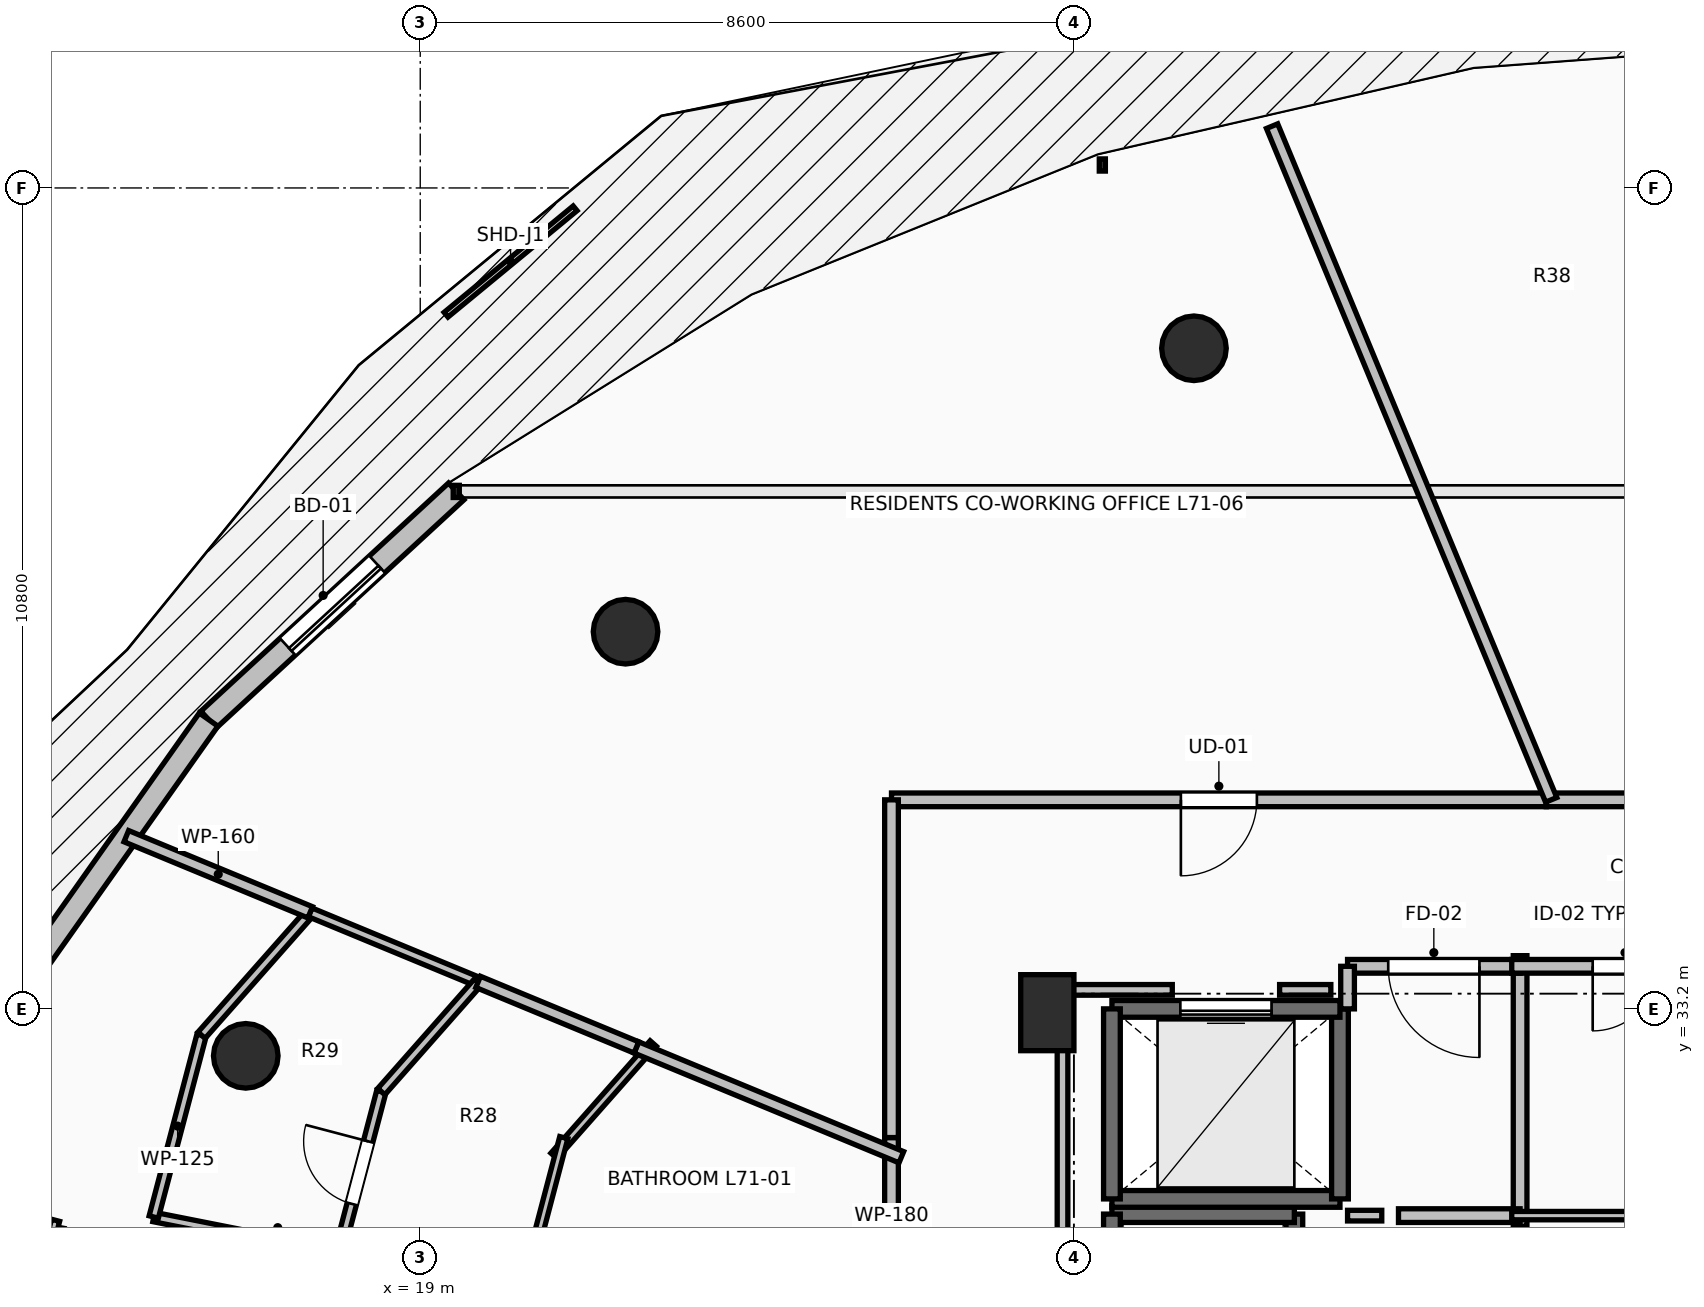
"""IFC4 building model, lengths in metres.
Left out: names, types, materials, properties, quantities, classifications, styles, units other than length and angle.
Written with IfcOpenShell. Run it as: python <this file> out.ifc"""

import sys

from ifc_helpers import new_model, si_unit, direction, frame, frame_2d, origin, origin_2d, place, context, subcontext, project, spatial, rectangle, circle, extrude, element, fill, save


model = new_model("IFC4")
c1 = context("Model", 3, precision=1e-05, world=origin(), true_north=direction((0.0, 1.0)))
c2 = subcontext(c1, "Body", "Model", "MODEL_VIEW")
j1 = project(units=[si_unit("LENGTHUNIT", "METRE"), si_unit("PLANEANGLEUNIT", "RADIAN")], contexts=[c1])
p1 = place(None, origin())
s1 = spatial("IfcSite", under=j1, at=p1, CompositionType="ELEMENT")
p2 = place(p1, origin())
s2 = spatial("IfcBuilding", under=s1, at=p2, CompositionType="ELEMENT")
p3 = place(p2, frame((0.0, 0.0, 262.65)))
s3 = spatial("IfcBuildingStorey", under=s2, at=p3, CompositionType="ELEMENT", Elevation=262.65)
for number, where, z_axis, x_axis in (
    (1, (29.179, 41.891, 0.0), (0.0, 0.0, 1.0), (-0.383, 0.924, 0.0)),
    (2, (21.701, 38.162, 0.0), (0.0, 0.0, 1.0), (-0.707, 0.707, 0.0)),
    (3, (16.705, 32.582, 0.0), (0.0, 0.0, 1.0), (-0.924, 0.383, 0.0)),
):
    element("IfcColumn", number, at=place(p3, frame(where, z_axis=z_axis, x_axis=x_axis)), inside=s3, PredefinedType="COLUMN", context=c2, shape_type="SweptSolid", body=[
        extrude(circle(Radius=0.425, at=origin_2d()), origin(), (0.0, 0.0, 1.0), 3.55),
    ])
p4 = place(p3, frame((27.25, 33.15, 0.0), z_axis=(0.0, 0.0, 1.0), x_axis=(1.0, 0.0, 0.0)))
e4 = element("IfcColumn", 4, at=p4, inside=s3, PredefinedType="PILASTER", context=c2, shape_type="SweptSolid", body=[
    extrude(rectangle(XDim=0.7, YDim=1.0, at=origin_2d()), origin(), (0.0, 0.0, 1.0), 3.55),
])
p5 = place(p3, frame((19.474, 40.008, 0.0), z_axis=(0.0, 0.0, 1.0), x_axis=(-0.735445373611, -0.677584018727, 0.0)))
e5 = element("IfcWall", 5, at=p5, inside=s3, PredefinedType="STANDARD", context=c2, shape_type="SweptSolid", body=[
    extrude(rectangle(XDim=4.43, YDim=0.3, at=frame_2d((2.215, 0.0))), origin(), (0.0, 0.0, 1.0), 3.29),
])
p6 = place(p5, frame((1.415, 0.0, 0.0)))
e6 = element("IfcOpeningElement", 6, at=p6, cuts=e5, PredefinedType="OPENING", context=c2, shape_type="SweptSolid", body=[
    extrude(rectangle(XDim=1.6, YDim=2.3, at=frame_2d((0.8, 1.15))), frame((0.0, 0.165, 0.0), z_axis=(0.0, -1.0, 0.0), x_axis=(1.0, 0.0, 0.0)), (0.0, 0.0, 1.0), 0.33),
])
p7 = place(p3, frame((16.216, 37.006, 0.0), z_axis=(0.0, 0.0, 1.0), x_axis=(-0.577261247247, -0.816559521668, 0.0)))
e7 = element("IfcWall", 7, at=p7, inside=s3, PredefinedType="STANDARD", context=c2, shape_type="SweptSolid", body=[
    extrude(rectangle(XDim=4.194, YDim=0.3, at=frame_2d((2.097, 0.0))), origin(), (0.0, 0.0, 1.0), 3.29),
])
p8 = place(p3, frame((30.5, 28.0, 0.0), z_axis=(0.0, 0.0, 1.0), x_axis=(0.0, 1.0, 0.0)))
e8 = element("IfcWall", 8, at=p8, inside=s3, PredefinedType="SHEAR", context=c2, shape_type="SweptSolid", body=[
    extrude(rectangle(XDim=2.5, YDim=0.22, at=frame_2d((1.25, 0.0))), origin(), (0.0, 0.0, 1.0), 3.29),
])
p9 = place(p3, frame((30.5, 30.5, 0.0), z_axis=(0.0, 0.0, 1.0), x_axis=(-1.0, 0.0, 0.0)))
e9 = element("IfcWall", 9, at=p9, inside=s3, PredefinedType="SHEAR", context=c2, shape_type="SweptSolid", body=[
    extrude(rectangle(XDim=2.4, YDim=0.22, at=frame_2d((1.2, 0.0))), origin(), (0.0, 0.0, 1.0), 3.29),
])
p10 = place(p3, frame((28.1, 30.5, 0.0), z_axis=(0.0, 0.0, 1.0), x_axis=(0.0, -1.0, 0.0)))
e10 = element("IfcWall", 10, at=p10, inside=s3, PredefinedType="SHEAR", context=c2, shape_type="SweptSolid", body=[
    extrude(rectangle(XDim=2.5, YDim=0.22, at=frame_2d((1.25, 0.0))), origin(), (0.0, 0.0, 1.0), 3.29),
])
p11 = place(p3, frame((28.1, 30.7, 0.0), z_axis=(0.0, 0.0, 1.0), x_axis=(1.0, 0.0, 0.0)))
e11 = element("IfcWall", 11, at=p11, inside=s3, PredefinedType="SOLIDWALL", context=c2, shape_type="SweptSolid", body=[
    extrude(rectangle(XDim=3.0, YDim=0.22, at=frame_2d((1.5, 0.0))), origin(), (0.0, 0.0, 1.0), 3.29),
])
p12 = place(p3, frame((31.1, 30.7, 0.0), z_axis=(0.0, 0.0, 1.0), x_axis=(0.0, 1.0, 0.0)))
e12 = element("IfcWall", 12, at=p12, inside=s3, PredefinedType="SOLIDWALL", context=c2, shape_type="SweptSolid", body=[
    extrude(rectangle(XDim=2.5, YDim=0.22, at=frame_2d((1.25, 0.0))), origin(), (0.0, 0.0, 1.0), 3.29),
])
p13 = place(p3, frame((31.1, 33.2, 0.0), z_axis=(0.0, 0.0, 1.0), x_axis=(-1.0, 0.0, 0.0)))
e13 = element("IfcWall", 13, at=p13, inside=s3, PredefinedType="SOLIDWALL", context=c2, shape_type="SweptSolid", body=[
    extrude(rectangle(XDim=3.0, YDim=0.22, at=frame_2d((1.5, 0.0))), origin(), (0.0, 0.0, 1.0), 3.29),
])
p14 = place(p13, frame((0.9, 0.0, 0.0)))
e14 = element("IfcOpeningElement", 14, at=p14, cuts=e13, PredefinedType="OPENING", context=c2, shape_type="SweptSolid", body=[
    extrude(rectangle(XDim=1.2, YDim=2.2, at=frame_2d((0.6, 1.1))), frame((0.0, 0.125, 0.0), z_axis=(0.0, -1.0, 0.0), x_axis=(1.0, 0.0, 0.0)), (0.0, 0.0, 1.0), 0.25),
])
p15 = place(p3, frame((28.1, 33.2, 0.0), z_axis=(0.0, 0.0, 1.0), x_axis=(0.0, -1.0, 0.0)))
e15 = element("IfcWall", 15, at=p15, inside=s3, PredefinedType="SOLIDWALL", context=c2, shape_type="SweptSolid", body=[
    extrude(rectangle(XDim=2.5, YDim=0.22, at=frame_2d((1.25, 0.0))), origin(), (0.0, 0.0, 1.0), 3.29),
])
p16 = place(p3, frame((33.47, 30.34, 0.0), z_axis=(0.0, 0.0, 1.0), x_axis=(0.0, 1.0, 0.0)))
e16 = element("IfcWall", 16, at=p16, inside=s3, PredefinedType="PARTITIONING", context=c2, shape_type="SweptSolid", body=[
    extrude(rectangle(XDim=3.56, YDim=0.18, at=frame_2d((1.78, 0.0))), origin(), (0.0, 0.0, 1.0), 3.29),
])
p17 = place(p3, frame((31.87, 30.48, 0.0), z_axis=(0.0, 0.0, 1.0), x_axis=(1.0, 0.0, 0.0)))
e17 = element("IfcWall", 17, at=p17, inside=s3, PredefinedType="PARTITIONING", context=c2, shape_type="SweptSolid", body=[
    extrude(rectangle(XDim=1.6, YDim=0.18, at=frame_2d((0.8, 0.0))), origin(), (0.0, 0.0, 1.0), 3.29),
])
p18 = place(p3, frame((33.47, 33.76, 0.0), z_axis=(0.0, 0.0, 1.0), x_axis=(-1.0, 0.0, 0.0)))
e18 = element("IfcWall", 18, at=p18, inside=s3, PredefinedType="PARTITIONING", context=c2, shape_type="SweptSolid", body=[
    extrude(rectangle(XDim=2.27, YDim=0.18, at=frame_2d((1.135, 0.0))), origin(), (0.0, 0.0, 1.0), 3.29),
])
p19 = place(p18, frame((0.535, 0.0, 0.0)))
e19 = element("IfcOpeningElement", 19, at=p19, cuts=e18, PredefinedType="OPENING", context=c2, shape_type="SweptSolid", body=[
    extrude(rectangle(XDim=1.2, YDim=2.15, at=frame_2d((0.6, 1.075))), frame((0.0, 0.105, 0.0), z_axis=(0.0, -1.0, 0.0), x_axis=(1.0, 0.0, 0.0)), (0.0, 0.0, 1.0), 0.21),
])
p20 = place(p3, frame((31.2, 33.76, 0.0), z_axis=(0.0, 0.0, 1.0), x_axis=(0.0, -1.0, 0.0)))
e20 = element("IfcWall", 20, at=p20, inside=s3, PredefinedType="PARTITIONING", context=c2, shape_type="SweptSolid", body=[
    extrude(rectangle(XDim=0.56, YDim=0.18, at=frame_2d((0.28, 0.0))), origin(), (0.0, 0.0, 1.0), 3.29),
])
p21 = place(p3, frame((33.36, 30.48, 0.0), z_axis=(0.0, 0.0, 1.0), x_axis=(1.0, 0.0, 0.0)))
e21 = element("IfcWall", 21, at=p21, inside=s3, PredefinedType="PARTITIONING", context=c2, shape_type="SweptSolid", body=[
    extrude(rectangle(XDim=1.81, YDim=0.11, at=frame_2d((0.905, 0.0))), origin(), (0.0, 0.0, 1.0), 3.29),
])
p22 = place(p3, frame((36.34, 33.76, 0.0), z_axis=(0.0, 0.0, 1.0), x_axis=(-1.0, 0.0, 0.0)))
e22 = element("IfcWall", 22, at=p22, inside=s3, PredefinedType="PARTITIONING", context=c2, shape_type="SweptSolid", body=[
    extrude(rectangle(XDim=2.98, YDim=0.18, at=frame_2d((1.49, 0.0))), origin(), (0.0, 0.0, 1.0), 3.29),
])
p23 = place(p22, frame((1.065, 0.0, 0.0)))
e23 = element("IfcOpeningElement", 23, at=p23, cuts=e22, PredefinedType="OPENING", context=c2, shape_type="SweptSolid", body=[
    extrude(rectangle(XDim=0.85, YDim=2.1, at=frame_2d((0.425, 1.05))), frame((0.0, 0.105, 0.0), z_axis=(0.0, -1.0, 0.0), x_axis=(1.0, 0.0, 0.0)), (0.0, 0.0, 1.0), 0.21),
])
p24 = place(p3, frame((25.2, 31.507, 0.0), z_axis=(0.0, 0.0, 1.0), x_axis=(0.0, -1.0, 0.0)))
e24 = element("IfcWall", 24, at=p24, inside=s3, PredefinedType="PARTITIONING", context=c2, shape_type="SweptSolid", body=[
    extrude(rectangle(XDim=3.048, YDim=0.18, at=frame_2d((1.524, 0.0))), origin(), (0.0, 0.0, 1.0), 2.482),
])
p25 = place(p3, frame((36.55, 35.95, 0.0), z_axis=(0.0, 0.0, 1.0), x_axis=(-1.0, 0.0, 0.0)))
e25 = element("IfcWall", 25, at=p25, inside=s3, PredefinedType="PARTITIONING", context=c2, shape_type="SweptSolid", body=[
    extrude(rectangle(XDim=2.736, YDim=0.18, at=frame_2d((1.368, 0.0))), origin(), (0.0, 0.0, 1.0), 3.29),
])
p26 = place(p3, frame((33.814, 35.95, 0.0), z_axis=(0.0, 0.0, 1.0), x_axis=(-1.0, 0.0, 0.0)))
e26 = element("IfcWall", 26, at=p26, inside=s3, PredefinedType="PARTITIONING", context=c2, shape_type="SweptSolid", body=[
    extrude(rectangle(XDim=8.614, YDim=0.18, at=frame_2d((4.307, 0.0))), origin(), (0.0, 0.0, 1.0), 2.482),
])
p27 = place(p26, frame((3.807, 0.0, 0.0)))
e27 = element("IfcOpeningElement", 27, at=p27, cuts=e26, PredefinedType="OPENING", context=c2, shape_type="SweptSolid", body=[
    extrude(rectangle(XDim=1.0, YDim=2.15, at=frame_2d((0.5, 1.075))), frame((0.0, 0.105, 0.0), z_axis=(0.0, -1.0, 0.0), x_axis=(1.0, 0.0, 0.0)), (0.0, 0.0, 1.0), 0.21),
])
p28 = place(p3, frame((25.2, 35.95, 0.0), z_axis=(0.0, 0.0, 1.0), x_axis=(0.0, -1.0, 0.0)))
e28 = element("IfcWall", 28, at=p28, inside=s3, PredefinedType="PARTITIONING", context=c2, shape_type="SweptSolid", body=[
    extrude(rectangle(XDim=4.443, YDim=0.18, at=frame_2d((2.221, 0.0))), origin(), (0.0, 0.0, 1.0), 2.482),
])
p29 = place(p3, frame((19.236, 29.72, 0.0), z_axis=(0.0, 0.0, 1.0), x_axis=(-0.980906665774, 0.194479081243, 0.0)))
e29 = element("IfcWall", 29, at=p29, inside=s3, PredefinedType="PARTITIONING", context=c2, shape_type="SweptSolid", body=[
    extrude(rectangle(XDim=3.815, YDim=0.125, at=frame_2d((1.907, 0.0))), origin(), (0.0, 0.0, 1.0), 2.874),
])
p30 = place(p29, frame((1.737, 0.0, 0.0)))
e30 = element("IfcOpeningElement", 30, at=p30, cuts=e29, PredefinedType="OPENING", context=c2, shape_type="SweptSolid", body=[
    extrude(rectangle(XDim=0.9, YDim=2.1, at=frame_2d((0.45, 1.05))), frame((0.0, 0.077, 0.0), z_axis=(0.0, -1.0, 0.0), x_axis=(1.0, 0.0, 0.0)), (0.0, 0.0, 1.0), 0.155),
])
p31 = place(p3, frame((15.494, 30.462, 0.0), z_axis=(0.0, 0.0, 1.0), x_axis=(0.254459276467, 0.967083489995, 0.0)))
e31 = element("IfcWall", 31, at=p31, inside=s3, PredefinedType="PARTITIONING", context=c2, shape_type="SweptSolid", body=[
    extrude(rectangle(XDim=2.472, YDim=0.125, at=frame_2d((1.236, 0.0))), origin(), (0.0, 0.0, 1.0), 3.29),
])
p32 = place(p3, frame((16.123, 32.853, 0.0), z_axis=(0.0, 0.0, 1.0), x_axis=(0.662205183315, 0.749322557508, 0.0)))
e32 = element("IfcWall", 32, at=p32, inside=s3, PredefinedType="PARTITIONING", context=c2, shape_type="SweptSolid", body=[
    extrude(rectangle(XDim=2.158, YDim=0.125, at=frame_2d((1.079, 0.0))), origin(), (0.0, 0.0, 1.0), 3.29),
])
p33 = place(p3, frame((17.552, 34.47, 0.0), z_axis=(0.0, 0.0, 1.0), x_axis=(0.923932252837, -0.382556129434, 0.0)))
e33 = element("IfcWall", 33, at=p33, inside=s3, PredefinedType="PARTITIONING", context=c2, shape_type="SweptSolid", body=[
    extrude(rectangle(XDim=2.392, YDim=0.125, at=frame_2d((1.196, 0.0))), origin(), (0.0, 0.0, 1.0), 2.874),
])
p34 = place(p3, frame((12.45, 30.592, 0.0), z_axis=(0.0, 0.0, 1.0), x_axis=(0.984212226867, -0.176992351488, 0.0)))
e34 = element("IfcWall", 34, at=p34, inside=s3, PredefinedType="PARTITIONING", context=c2, shape_type="SweptSolid", body=[
    extrude(rectangle(XDim=1.884, YDim=0.11, at=frame_2d((0.942, 0.0))), origin(), (0.0, 0.0, 1.0), 3.29),
])
p35 = place(p3, frame((14.203, 30.418, 0.0), z_axis=(0.0, 0.0, 1.0), x_axis=(-0.254460123068, -0.967083267236, 0.0)))
e35 = element("IfcWall", 35, at=p35, inside=s3, PredefinedType="PARTITIONING", context=c2, shape_type="SweptSolid", body=[
    extrude(rectangle(XDim=4.709, YDim=0.11, at=frame_2d((2.354, 0.0))), origin(), (0.0, 0.0, 1.0), 3.29),
])
p36 = place(p35, frame((1.904, 0.0, 0.0)))
e36 = element("IfcOpeningElement", 36, at=p36, cuts=e35, PredefinedType="OPENING", context=c2, shape_type="SweptSolid", body=[
    extrude(rectangle(XDim=0.9, YDim=2.1, at=frame_2d((0.45, 1.05))), frame((0.0, 0.07, 0.0), z_axis=(0.0, -1.0, 0.0), x_axis=(1.0, 0.0, 0.0)), (0.0, 0.0, 1.0), 0.14),
])
p37 = place(p3, frame((17.552, 34.47, 0.0), z_axis=(0.0, 0.0, 1.0), x_axis=(-0.9239134198, 0.382601610965, 0.0)))
e37 = element("IfcWall", 37, at=p37, inside=s3, PredefinedType="PARTITIONING", context=c2, shape_type="SweptSolid", body=[
    extrude(rectangle(XDim=2.618, YDim=0.16, at=frame_2d((1.309, 0.0))), origin(), (0.0, 0.0, 1.0), 3.29),
])
p38 = place(p3, frame((17.927, 29.98, 0.0), z_axis=(0.0, 0.0, 1.0), x_axis=(0.254476946675, 0.967078840432, 0.0)))
e38 = element("IfcWall", 38, at=p38, inside=s3, PredefinedType="PARTITIONING", context=c2, shape_type="SweptSolid", body=[
    extrude(rectangle(XDim=2.205, YDim=0.125, at=frame_2d((1.102, 0.0))), origin(), (0.0, 0.0, 1.0), 2.482),
])
p39 = place(p38, frame((0.677, 0.0, 0.0)))
e39 = element("IfcOpeningElement", 39, at=p39, cuts=e38, PredefinedType="OPENING", context=c2, shape_type="SweptSolid", body=[
    extrude(rectangle(XDim=0.85, YDim=2.1, at=frame_2d((0.425, 1.05))), frame((0.0, 0.077, 0.0), z_axis=(0.0, -1.0, 0.0), x_axis=(1.0, 0.0, 0.0)), (0.0, 0.0, 1.0), 0.155),
])
p40 = place(p3, frame((18.488, 32.112, 0.0), z_axis=(0.0, 0.0, 1.0), x_axis=(0.661856531983, 0.749630529709, 0.0)))
e40 = element("IfcWall", 40, at=p40, inside=s3, PredefinedType="PARTITIONING", context=c2, shape_type="SweptSolid", body=[
    extrude(rectangle(XDim=1.925, YDim=0.125, at=frame_2d((0.962, 0.0))), origin(), (0.0, 0.0, 1.0), 2.482),
])
p41 = place(p3, frame((22.066, 32.744, 0.0), z_axis=(0.0, 0.0, 1.0), x_axis=(-0.662047420969, -0.749461948593, 0.0)))
e41 = element("IfcWall", 41, at=p41, inside=s3, PredefinedType="PARTITIONING", context=c2, shape_type="SweptSolid", body=[
    extrude(rectangle(XDim=1.972, YDim=0.11, at=frame_2d((0.986, 0.0))), origin(), (0.0, 0.0, 1.0), 3.29),
])
p42 = place(p3, frame((20.889, 31.506, 0.0), z_axis=(0.0, 0.0, 1.0), x_axis=(-0.254406599134, -0.967097348935, 0.0)))
e42 = element("IfcWall", 42, at=p42, inside=s3, PredefinedType="PARTITIONING", context=c2, shape_type="SweptSolid", body=[
    extrude(rectangle(XDim=2.218, YDim=0.11, at=frame_2d((1.109, 0.0))), origin(), (0.0, 0.0, 1.0), 2.482),
])
p43 = place(p3, frame((25.329, 31.248, 0.0), z_axis=(0.0, 0.0, 1.0), x_axis=(-0.923827524065, 0.382808967736, 0.0)))
e43 = element("IfcWall", 43, at=p43, inside=s3, PredefinedType="PARTITIONING", context=c2, shape_type="SweptSolid", body=[
    extrude(rectangle(XDim=3.773, YDim=0.16, at=frame_2d((1.886, 0.0))), origin(), (0.0, 0.0, 1.0), 2.936),
])
p44 = place(p3, frame((21.844, 32.693, 0.0), z_axis=(0.0, 0.0, 1.0), x_axis=(-0.92387949598, 0.382683520559, 0.0)))
e44 = element("IfcWall", 44, at=p44, inside=s3, PredefinedType="PARTITIONING", context=c2, shape_type="SweptSolid", body=[
    extrude(rectangle(XDim=2.253, YDim=0.16, at=frame_2d((1.127, 0.0))), origin(), (0.0, 0.0, 1.0), 3.022),
])
p45 = place(p3, frame((30.207, 44.813, 0.0), z_axis=(0.0, 0.0, 1.0), x_axis=(0.38274436158, -0.92385429245, 0.0)))
e45 = element("IfcWall", 45, at=p45, inside=s3, PredefinedType="PARTITIONING", context=c2, shape_type="SweptSolid", body=[
    extrude(rectangle(XDim=9.594, YDim=0.16, at=frame_2d((4.797, 0.0))), origin(), (0.0, 0.0, 1.0), 2.482),
])
p46 = place(p3, frame((31.2, 30.48, 0.0), z_axis=(0.0, 0.0, 1.0), x_axis=(1.0, 0.0, 0.0)))
e46 = element("IfcWall", 46, at=p46, inside=s3, PredefinedType="PARTITIONING", context=c2, shape_type="SweptSolid", body=[
    extrude(rectangle(XDim=0.45, YDim=0.14, at=frame_2d((0.225, 0.0))), origin(), (0.0, 0.0, 1.0), 3.29),
])
p47 = place(p3, frame((30.98, 33.45, 0.0), z_axis=(0.0, 0.0, 1.0), x_axis=(-1.0, 0.0, 0.0)))
e47 = element("IfcWall", 47, at=p47, inside=s3, PredefinedType="PARTITIONING", context=c2, shape_type="SweptSolid", body=[
    extrude(rectangle(XDim=0.674, YDim=0.14, at=frame_2d((0.337, 0.0))), origin(), (0.0, 0.0, 1.0), 3.29),
])
p48 = place(p3, frame((28.894, 33.45, 0.0), z_axis=(0.0, 0.0, 1.0), x_axis=(-1.0, 0.0, 0.0)))
e48 = element("IfcWall", 48, at=p48, inside=s3, PredefinedType="PARTITIONING", context=c2, shape_type="SweptSolid", body=[
    extrude(rectangle(XDim=1.444, YDim=0.14, at=frame_2d((0.722, 0.0))), origin(), (0.0, 0.0, 1.0), 2.482),
])
p49 = place(p3, frame((27.45, 33.45, 0.0), z_axis=(0.0, 0.0, 1.0), x_axis=(0.0, -1.0, 0.0)))
e49 = element("IfcWall", 49, at=p49, inside=s3, PredefinedType="PARTITIONING", context=c2, shape_type="SweptSolid", body=[
    extrude(rectangle(XDim=5.254, YDim=0.14, at=frame_2d((2.627, 0.0))), origin(), (0.0, 0.0, 1.0), 2.482),
])
p50 = place(p6, origin())
e50 = element("IfcDoor", 50, at=p50, inside=s3, OperationType="SLIDING_TO_LEFT", PredefinedType="DOOR", context=c2, shape_type="SweptSolid", body=[
    extrude(rectangle(XDim=1.6, YDim=2.3, at=frame_2d((0.8, 1.15))), frame((0.0, 0.025, 0.0), z_axis=(0.0, -1.0, 0.0), x_axis=(1.0, 0.0, 0.0)), (0.0, 0.0, 1.0), 0.05),
])
fill(e6, e50)
p51 = place(p14, origin())
e51 = element("IfcDoor", 51, at=p51, inside=s3, OperationType="SLIDING_TO_LEFT", PredefinedType="DOOR", context=c2, shape_type="SweptSolid", body=[
    extrude(rectangle(XDim=1.2, YDim=2.2, at=frame_2d((0.6, 1.1))), frame((0.0, 0.025, 0.0), z_axis=(0.0, -1.0, 0.0), x_axis=(1.0, 0.0, 0.0)), (0.0, 0.0, 1.0), 0.05),
])
fill(e14, e51)
p52 = place(p19, origin())
e52 = element("IfcDoor", 52, at=p52, inside=s3, OperationType="SINGLE_SWING_LEFT", PredefinedType="DOOR", context=c2, shape_type="SweptSolid", body=[
    extrude(rectangle(XDim=1.2, YDim=2.15, at=frame_2d((0.6, 1.075))), frame((0.0, 0.025, 0.0), z_axis=(0.0, -1.0, 0.0), x_axis=(1.0, 0.0, 0.0)), (0.0, 0.0, 1.0), 0.05),
])
fill(e19, e52)
p53 = place(p23, origin())
e53 = element("IfcDoor", 53, at=p53, inside=s3, OperationType="SINGLE_SWING_RIGHT", PredefinedType="DOOR", context=c2, shape_type="SweptSolid", body=[
    extrude(rectangle(XDim=0.85, YDim=2.1, at=frame_2d((0.425, 1.05))), frame((0.0, 0.025, 0.0), z_axis=(0.0, -1.0, 0.0), x_axis=(1.0, 0.0, 0.0)), (0.0, 0.0, 1.0), 0.05),
])
fill(e23, e53)
p54 = place(p27, origin())
e54 = element("IfcDoor", 54, at=p54, inside=s3, OperationType="SINGLE_SWING_RIGHT", PredefinedType="DOOR", context=c2, shape_type="SweptSolid", body=[
    extrude(rectangle(XDim=1.0, YDim=2.15, at=frame_2d((0.5, 1.075))), frame((0.0, 0.025, 0.0), z_axis=(0.0, -1.0, 0.0), x_axis=(1.0, 0.0, 0.0)), (0.0, 0.0, 1.0), 0.05),
])
fill(e27, e54)
p55 = place(p39, origin())
e55 = element("IfcDoor", 55, at=p55, inside=s3, OperationType="SINGLE_SWING_RIGHT", PredefinedType="DOOR", context=c2, shape_type="SweptSolid", body=[
    extrude(rectangle(XDim=0.85, YDim=2.1, at=frame_2d((0.425, 1.05))), frame((0.0, 0.025, 0.0), z_axis=(0.0, -1.0, 0.0), x_axis=(1.0, 0.0, 0.0)), (0.0, 0.0, 1.0), 0.05),
])
fill(e39, e55)
save(model, sys.argv[1])
